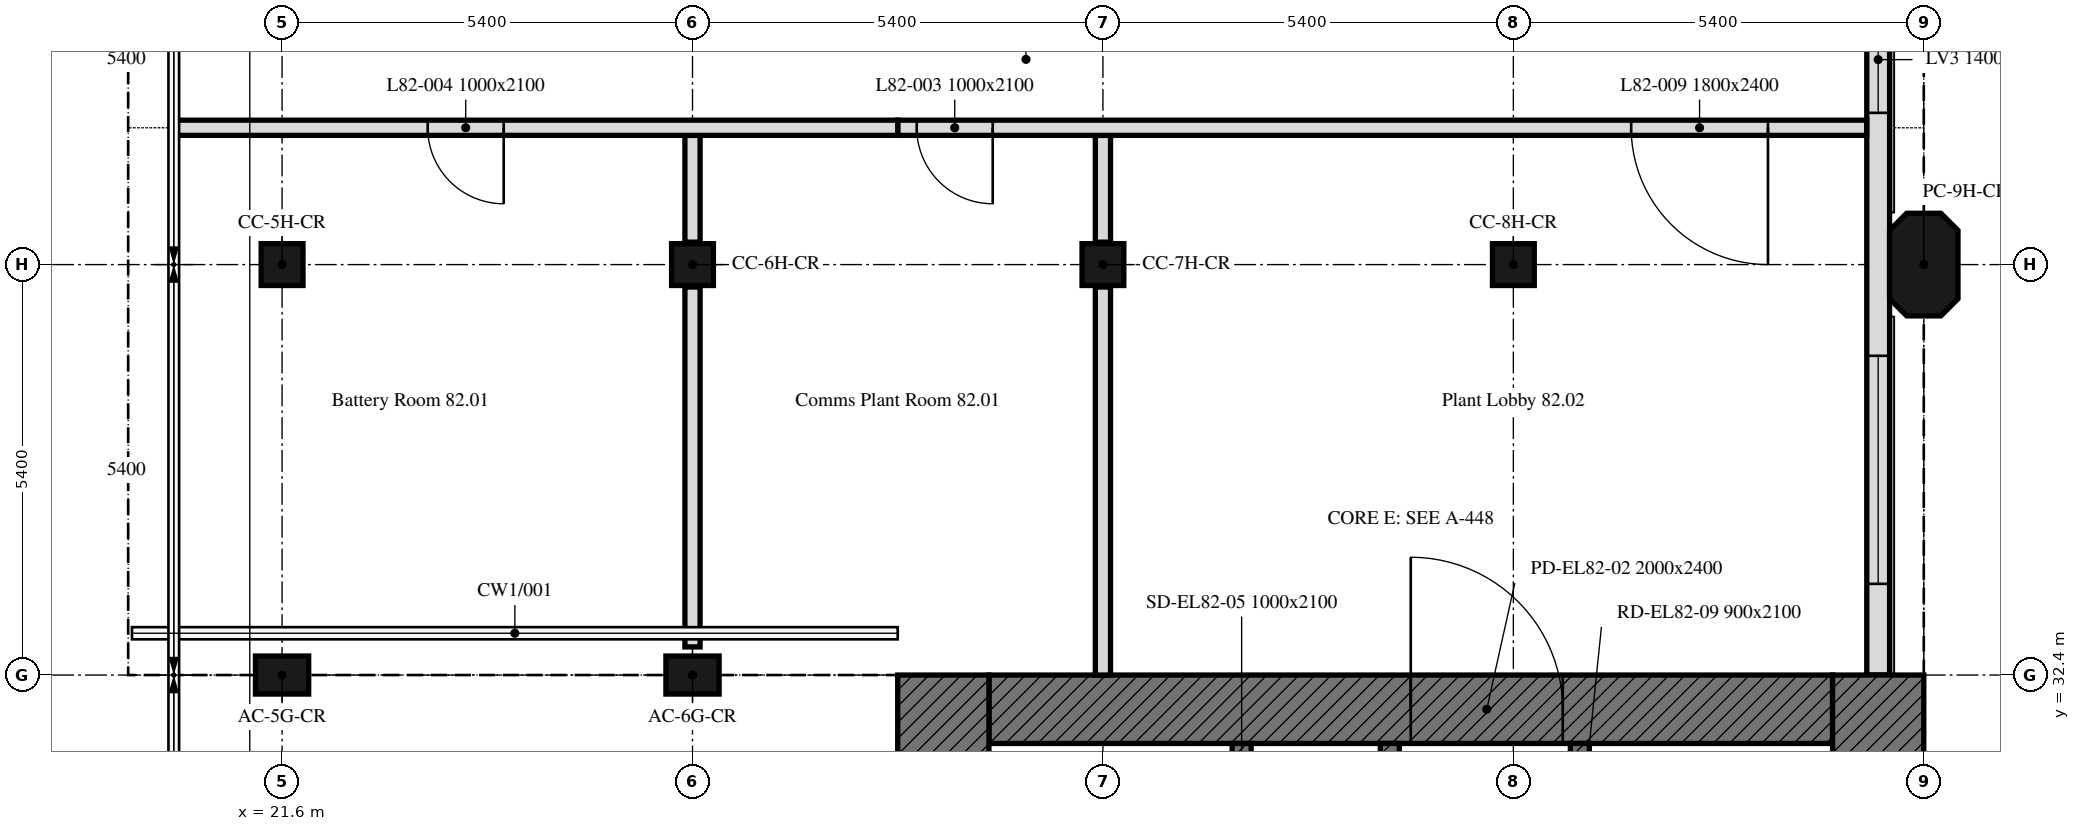
"""IFC4 building model, lengths in metres.
Left out: names, types, materials, properties, quantities, classifications, styles, units other than length and angle.
Written with IfcOpenShell. Run it as: python <this file> out.ifc"""

import sys

from ifc_helpers import new_model, si_unit, direction, frame, frame_2d, origin, origin_2d, place, context, subcontext, project, spatial, polyline, rectangle, outline, extrude, element, fill, save


model = new_model("IFC4")
c1 = context("Model", 3, precision=1e-05, world=origin(), true_north=direction((0.0, 1.0)))
c2 = subcontext(c1, "Body", "Model", "MODEL_VIEW")
j1 = project(units=[si_unit("LENGTHUNIT", "METRE"), si_unit("PLANEANGLEUNIT", "RADIAN")], contexts=[c1])
p1 = place(None, origin())
s1 = spatial("IfcSite", under=j1, at=p1, CompositionType="ELEMENT")
p2 = place(p1, origin())
s2 = spatial("IfcBuilding", under=s1, at=p2, CompositionType="ELEMENT")
p3 = place(p2, frame((0.0, 0.0, 330.7)))
s3 = spatial("IfcBuildingStorey", under=s2, at=p3, CompositionType="ELEMENT", Elevation=330.7)
p4 = place(p3, frame((21.6, 32.4, 0.0), z_axis=(0.0, 0.0, 1.0), x_axis=(1.0, 0.0, 0.0)))
e1 = element("IfcColumn", 1, at=p4, inside=s3, PredefinedType="COLUMN", context=c2, shape_type="SweptSolid", body=[
    extrude(rectangle(XDim=0.7, YDim=0.5, at=origin_2d()), origin(), (0.0, 0.0, 1.0), 3.6),
])
p5 = place(p3, frame((27.0, 32.4, 0.0), z_axis=(0.0, 0.0, 1.0), x_axis=(1.0, 0.0, 0.0)))
e2 = element("IfcColumn", 2, at=p5, inside=s3, PredefinedType="COLUMN", context=c2, shape_type="SweptSolid", body=[
    extrude(rectangle(XDim=0.7, YDim=0.5, at=origin_2d()), origin(), (0.0, 0.0, 1.0), 4.2),
])
p6 = place(p3, frame((21.6, 37.8, 0.0), z_axis=(0.0, 0.0, 1.0), x_axis=(1.0, 0.0, 0.0)))
e3 = element("IfcColumn", 3, at=p6, inside=s3, PredefinedType="COLUMN", context=c2, shape_type="SweptSolid", body=[
    extrude(rectangle(XDim=0.55, YDim=0.55, at=origin_2d()), origin(), (0.0, 0.0, 1.0), 3.6),
])
for number, where, z_axis, x_axis in (
    (4, (27.0, 37.8, 0.0), (0.0, 0.0, 1.0), (1.0, 0.0, 0.0)),
    (5, (32.4, 37.8, 0.0), (0.0, 0.0, 1.0), (1.0, 0.0, 0.0)),
    (6, (37.8, 37.8, 0.0), (0.0, 0.0, 1.0), (1.0, 0.0, 0.0)),
):
    element("IfcColumn", number, at=place(p3, frame(where, z_axis=z_axis, x_axis=x_axis)), inside=s3, PredefinedType="COLUMN", context=c2, shape_type="SweptSolid", body=[
        extrude(rectangle(XDim=0.55, YDim=0.55, at=origin_2d()), origin(), (0.0, 0.0, 1.0), 4.2),
    ])
p7 = place(p3, frame((43.2, 37.8, 0.0), z_axis=(0.0, 0.0, 1.0), x_axis=(0.0, 1.0, 0.0)))
e7 = element("IfcColumn", 7, at=p7, inside=s3, PredefinedType="COLUMN", context=c2, shape_type="SweptSolid", body=[
    extrude(outline(polyline([(-0.45, -0.45), (0.45, -0.45), (0.675, -0.225), (0.675, 0.225), (0.45, 0.45), (-0.45, 0.45), (-0.675, 0.225), (-0.675, -0.225), (-0.45, -0.45)])), origin(), (0.0, 0.0, 1.0), 4.2),
])
p8 = place(p3, frame((42.6, 32.4, 0.0), z_axis=(0.0, 0.0, 1.0), x_axis=(0.0, 1.0, 0.0)))
e8 = element("IfcWall", 8, at=p8, inside=s3, PredefinedType="SOLIDWALL", context=c2, shape_type="SweptSolid", body=[
    extrude(outline(polyline([(0.0, 0.0), (10.614, 0.0), (10.614, 4.2), (10.024, 4.2), (9.434, 4.2), (8.845, 4.2), (8.255, 4.2), (7.665, 4.2), (7.076, 4.2), (6.486, 4.2), (5.896, 4.2), (5.307, 4.2), (4.717, 4.2), (4.127, 4.2), (3.538, 4.2), (2.948, 4.2), (2.359, 4.2), (1.769, 4.2), (1.179, 4.2), (0.59, 4.2), (0.0, 4.2), (0.0, 0.0)])), frame((0.0, 0.15, 0.0), z_axis=(0.0, -1.0, 0.0), x_axis=(1.0, 0.0, 0.0)), (0.0, 0.0, 1.0), 0.3),
])
p9 = place(p8, frame((1.2, 0.0, 0.6)))
e9 = element("IfcOpeningElement", 9, at=p9, cuts=e8, PredefinedType="OPENING", context=c2, shape_type="SweptSolid", body=[
    extrude(rectangle(XDim=3.0, YDim=1.8, at=frame_2d((1.5, 0.9))), frame((0.0, 0.16, 0.0), z_axis=(0.0, -1.0, 0.0), x_axis=(1.0, 0.0, 0.0)), (0.0, 0.0, 1.0), 0.32),
])
p10 = place(p8, frame((7.396, 0.0, 0.6)))
e10 = element("IfcOpeningElement", 10, at=p10, cuts=e8, PredefinedType="OPENING", context=c2, shape_type="SweptSolid", body=[
    extrude(rectangle(XDim=1.4, YDim=1.8, at=frame_2d((0.7, 0.9))), frame((0.0, 0.16, 0.0), z_axis=(0.0, -1.0, 0.0), x_axis=(1.0, 0.0, 0.0)), (0.0, 0.0, 1.0), 0.32),
])
p11 = place(p3, frame((30.9, 31.95, 0.0), z_axis=(0.0, 0.0, 1.0), x_axis=(1.0, 0.0, 0.0)))
e11 = element("IfcWall", 11, at=p11, inside=s3, PredefinedType="SOLIDWALL", context=c2, shape_type="SweptSolid", body=[
    extrude(rectangle(XDim=11.1, YDim=0.9, at=frame_2d((5.55, 0.0))), origin(), (0.0, 0.0, 1.0), 4.2),
])
p12 = place(p11, frame((5.55, 0.0, 0.0)))
e12 = element("IfcOpeningElement", 12, at=p12, cuts=e11, PredefinedType="OPENING", context=c2, shape_type="SweptSolid", body=[
    extrude(rectangle(XDim=2.0, YDim=2.4, at=frame_2d((1.0, 1.2))), frame((0.0, 0.45, 0.0), z_axis=(0.0, -1.0, 0.0), x_axis=(1.0, 0.0, 0.0)), (0.0, 0.0, 1.0), 0.9),
])
for number, where, z_axis, x_axis in (
    (13, (42.6, 32.4, 0.0), (0.0, 0.0, 1.0), (0.0, -1.0, 0.0)),
    (14, (30.3, 16.2, 0.0), (0.0, 0.0, 1.0), (0.0, 1.0, 0.0)),
):
    element("IfcWall", number, at=place(p3, frame(where, z_axis=z_axis, x_axis=x_axis)), inside=s3, PredefinedType="SOLIDWALL", context=c2, shape_type="SweptSolid", body=[
        extrude(rectangle(XDim=16.2, YDim=1.2, at=frame_2d((8.1, 0.0))), origin(), (0.0, 0.0, 1.0), 4.2),
    ])
p13 = place(p3, frame((38.675, 17.1, 0.0), z_axis=(0.0, 0.0, 1.0), x_axis=(0.0, 1.0, 0.0)))
e15 = element("IfcWall", 15, at=p13, inside=s3, PredefinedType="SOLIDWALL", context=c2, shape_type="SweptSolid", body=[
    extrude(rectangle(XDim=14.4, YDim=0.25, at=frame_2d((7.2, 0.0))), origin(), (0.0, 0.0, 1.0), 4.2),
])
p14 = place(p13, frame((4.6, 0.0, 0.0)))
e16 = element("IfcOpeningElement", 16, at=p14, cuts=e15, PredefinedType="OPENING", context=c2, shape_type="SweptSolid", body=[
    extrude(rectangle(XDim=1.0, YDim=2.1, at=frame_2d((0.5, 1.05))), frame((0.0, 0.125, 0.0), z_axis=(0.0, -1.0, 0.0), x_axis=(1.0, 0.0, 0.0)), (0.0, 0.0, 1.0), 0.25),
])
p15 = place(p13, frame((7.062, 0.0, 0.0)))
e17 = element("IfcOpeningElement", 17, at=p15, cuts=e15, PredefinedType="OPENING", context=c2, shape_type="SweptSolid", body=[
    extrude(rectangle(XDim=1.2, YDim=2.1, at=frame_2d((0.6, 1.05))), frame((0.0, 0.125, 0.0), z_axis=(0.0, -1.0, 0.0), x_axis=(1.0, 0.0, 0.0)), (0.0, 0.0, 1.0), 0.25),
])
p16 = place(p13, frame((10.106, 0.0, 0.0)))
e18 = element("IfcOpeningElement", 18, at=p16, cuts=e15, PredefinedType="OPENING", context=c2, shape_type="SweptSolid", body=[
    extrude(rectangle(XDim=0.9, YDim=2.1, at=frame_2d((0.45, 1.05))), frame((0.0, 0.125, 0.0), z_axis=(0.0, -1.0, 0.0), x_axis=(1.0, 0.0, 0.0)), (0.0, 0.0, 1.0), 0.25),
])
p17 = place(p13, frame((12.719, 0.0, 0.0)))
e19 = element("IfcOpeningElement", 19, at=p17, cuts=e15, PredefinedType="OPENING", context=c2, shape_type="SweptSolid", body=[
    extrude(rectangle(XDim=0.9, YDim=2.1, at=frame_2d((0.45, 1.05))), frame((0.0, 0.125, 0.0), z_axis=(0.0, -1.0, 0.0), x_axis=(1.0, 0.0, 0.0)), (0.0, 0.0, 1.0), 0.25),
])
p18 = place(p3, frame((34.225, 17.1, 0.0), z_axis=(0.0, 0.0, 1.0), x_axis=(0.0, 1.0, 0.0)))
e20 = element("IfcWall", 20, at=p18, inside=s3, PredefinedType="SOLIDWALL", context=c2, shape_type="SweptSolid", body=[
    extrude(rectangle(XDim=14.4, YDim=0.25, at=frame_2d((7.2, 0.0))), origin(), (0.0, 0.0, 1.0), 4.2),
])
p19 = place(p18, frame((13.15, 0.0, 0.0)))
e21 = element("IfcOpeningElement", 21, at=p19, cuts=e20, PredefinedType="OPENING", context=c2, shape_type="SweptSolid", body=[
    extrude(rectangle(XDim=1.0, YDim=2.1, at=frame_2d((0.5, 1.05))), frame((0.0, 0.125, 0.0), z_axis=(0.0, -1.0, 0.0), x_axis=(1.0, 0.0, 0.0)), (0.0, 0.0, 1.0), 0.25),
])
p20 = place(p18, frame((0.968, 0.0, 0.0)))
e22 = element("IfcOpeningElement", 22, at=p20, cuts=e20, PredefinedType="OPENING", context=c2, shape_type="SweptSolid", body=[
    extrude(rectangle(XDim=0.9, YDim=2.1, at=frame_2d((0.45, 1.05))), frame((0.0, 0.125, 0.0), z_axis=(0.0, -1.0, 0.0), x_axis=(1.0, 0.0, 0.0)), (0.0, 0.0, 1.0), 0.25),
])
p21 = place(p18, frame((3.468, 0.0, 0.0)))
e23 = element("IfcOpeningElement", 23, at=p21, cuts=e20, PredefinedType="OPENING", context=c2, shape_type="SweptSolid", body=[
    extrude(rectangle(XDim=0.9, YDim=2.1, at=frame_2d((0.45, 1.05))), frame((0.0, 0.125, 0.0), z_axis=(0.0, -1.0, 0.0), x_axis=(1.0, 0.0, 0.0)), (0.0, 0.0, 1.0), 0.25),
])
p22 = place(p18, frame((6.175, 0.0, 0.0)))
e24 = element("IfcOpeningElement", 24, at=p22, cuts=e20, PredefinedType="OPENING", context=c2, shape_type="SweptSolid", body=[
    extrude(rectangle(XDim=0.9, YDim=2.1, at=frame_2d((0.45, 1.05))), frame((0.0, 0.125, 0.0), z_axis=(0.0, -1.0, 0.0), x_axis=(1.0, 0.0, 0.0)), (0.0, 0.0, 1.0), 0.25),
])
p23 = place(p3, frame((36.175, 29.4, 0.0), z_axis=(0.0, 0.0, 1.0), x_axis=(0.0, 1.0, 0.0)))
e25 = element("IfcWall", 25, at=p23, inside=s3, PredefinedType="SOLIDWALL", context=c2, shape_type="SweptSolid", body=[
    extrude(rectangle(XDim=2.1, YDim=0.25, at=frame_2d((1.05, 0.0))), origin(), (0.0, 0.0, 1.0), 4.2),
])
p24 = place(p23, frame((0.5, 0.0, 0.0)))
e26 = element("IfcOpeningElement", 26, at=p24, cuts=e25, PredefinedType="OPENING", context=c2, shape_type="SweptSolid", body=[
    extrude(rectangle(XDim=1.0, YDim=2.1, at=frame_2d((0.5, 1.05))), frame((0.0, 0.125, 0.0), z_axis=(0.0, -1.0, 0.0), x_axis=(1.0, 0.0, 0.0)), (0.0, 0.0, 1.0), 0.25),
])
p25 = place(p3, frame((32.4, 32.4, 0.0), z_axis=(0.0, 0.0, 1.0), x_axis=(0.0, 1.0, 0.0)))
e27 = element("IfcWall", 27, at=p25, inside=s3, PredefinedType="PARTITIONING", context=c2, shape_type="SweptSolid", body=[
    extrude(rectangle(XDim=5.105, YDim=0.2, at=frame_2d((2.552, 0.0))), origin(), (0.0, 0.0, 1.0), 3.45),
])
p26 = place(p3, frame((32.4, 38.095, 0.0), z_axis=(0.0, 0.0, 1.0), x_axis=(0.0, 1.0, 0.0)))
e28 = element("IfcWall", 28, at=p26, inside=s3, PredefinedType="PARTITIONING", context=c2, shape_type="SweptSolid", body=[
    extrude(rectangle(XDim=1.405, YDim=0.2, at=frame_2d((0.703, 0.0))), origin(), (0.0, 0.0, 1.0), 3.45),
])
p27 = place(p3, frame((27.0, 39.5, 0.0), z_axis=(0.0, 0.0, 1.0), x_axis=(0.0, -1.0, 0.0)))
e29 = element("IfcWall", 29, at=p27, inside=s3, PredefinedType="PARTITIONING", context=c2, shape_type="SweptSolid", body=[
    extrude(rectangle(XDim=1.405, YDim=0.2, at=frame_2d((0.703, 0.0))), origin(), (0.0, 0.0, 1.0), 6.0),
])
p28 = place(p3, frame((27.0, 37.505, 0.0), z_axis=(0.0, 0.0, 1.0), x_axis=(0.0, -1.0, 0.0)))
e30 = element("IfcWall", 30, at=p28, inside=s3, PredefinedType="PARTITIONING", context=c2, shape_type="SweptSolid", body=[
    extrude(rectangle(XDim=4.735, YDim=0.2, at=frame_2d((2.367, 0.0))), origin(), (0.0, 0.0, 1.0), 6.0),
])
p29 = place(p3, frame((42.449, 39.6, 0.0), z_axis=(0.0, 0.0, 1.0), x_axis=(-1.0, 0.0, 0.0)))
e31 = element("IfcWall", 31, at=p29, inside=s3, PredefinedType="PARTITIONING", context=c2, shape_type="SweptSolid", body=[
    extrude(rectangle(XDim=12.749, YDim=0.2, at=frame_2d((6.375, 0.0))), origin(), (0.0, 0.0, 1.0), 3.45),
])
p30 = place(p29, frame((11.499, 0.0, 0.0)))
e32 = element("IfcOpeningElement", 32, at=p30, cuts=e31, PredefinedType="OPENING", context=c2, shape_type="SweptSolid", body=[
    extrude(rectangle(XDim=1.0, YDim=2.1, at=frame_2d((0.5, 1.05))), frame((0.0, 0.1, 0.0), z_axis=(0.0, -1.0, 0.0), x_axis=(1.0, 0.0, 0.0)), (0.0, 0.0, 1.0), 0.2),
])
p31 = place(p29, frame((1.299, 0.0, 0.0)))
e33 = element("IfcOpeningElement", 33, at=p31, cuts=e31, PredefinedType="OPENING", context=c2, shape_type="SweptSolid", body=[
    extrude(rectangle(XDim=1.8, YDim=2.4, at=frame_2d((0.9, 1.2))), frame((0.0, 0.1, 0.0), z_axis=(0.0, -1.0, 0.0), x_axis=(1.0, 0.0, 0.0)), (0.0, 0.0, 1.0), 0.2),
])
p32 = place(p3, frame((29.7, 39.6, 0.0), z_axis=(0.0, 0.0, 1.0), x_axis=(-1.0, 0.0, 0.0)))
e34 = element("IfcWall", 34, at=p32, inside=s3, PredefinedType="PARTITIONING", context=c2, shape_type="SweptSolid", body=[
    extrude(outline(polyline([(0.0, 0.0), (9.525, 0.0), (9.525, 2.967), (0.0, 4.2), (0.0, 0.0)])), frame((0.0, 0.1, 0.0), z_axis=(0.0, -1.0, 0.0), x_axis=(1.0, 0.0, 0.0)), (0.0, 0.0, 1.0), 0.2),
])
p33 = place(p32, frame((5.184, 0.0, 0.0)))
e35 = element("IfcOpeningElement", 35, at=p33, cuts=e34, PredefinedType="OPENING", context=c2, shape_type="SweptSolid", body=[
    extrude(rectangle(XDim=1.0, YDim=2.1, at=frame_2d((0.5, 1.05))), frame((0.0, 0.1, 0.0), z_axis=(0.0, -1.0, 0.0), x_axis=(1.0, 0.0, 0.0)), (0.0, 0.0, 1.0), 0.2),
])
p34 = place(p9, origin())
e36 = element("IfcWindow", 36, at=p34, inside=s3, PartitioningType="SINGLE_PANEL", PredefinedType="WINDOW", context=c2, shape_type="SweptSolid", body=[
    extrude(rectangle(XDim=3.0, YDim=1.8, at=frame_2d((1.5, 0.9))), frame((0.0, 0.03, 0.0), z_axis=(0.0, -1.0, 0.0), x_axis=(1.0, 0.0, 0.0)), (0.0, 0.0, 1.0), 0.06),
])
fill(e9, e36)
p35 = place(p10, origin())
e37 = element("IfcWindow", 37, at=p35, inside=s3, PartitioningType="SINGLE_PANEL", PredefinedType="WINDOW", context=c2, shape_type="SweptSolid", body=[
    extrude(rectangle(XDim=1.4, YDim=1.8, at=frame_2d((0.7, 0.9))), frame((0.0, 0.03, 0.0), z_axis=(0.0, -1.0, 0.0), x_axis=(1.0, 0.0, 0.0)), (0.0, 0.0, 1.0), 0.06),
])
fill(e10, e37)
p36 = place(p12, origin())
e38 = element("IfcDoor", 38, at=p36, inside=s3, OperationType="DOUBLE_DOOR_SINGLE_SWING", PredefinedType="DOOR", context=c2, shape_type="SweptSolid", body=[
    extrude(rectangle(XDim=2.0, YDim=2.4, at=frame_2d((1.0, 1.2))), frame((0.0, 0.025, 0.0), z_axis=(0.0, -1.0, 0.0), x_axis=(1.0, 0.0, 0.0)), (0.0, 0.0, 1.0), 0.05),
])
fill(e12, e38)
p37 = place(p30, origin())
e39 = element("IfcDoor", 39, at=p37, inside=s3, OperationType="SINGLE_SWING_RIGHT", PredefinedType="DOOR", context=c2, shape_type="SweptSolid", body=[
    extrude(rectangle(XDim=1.0, YDim=2.1, at=frame_2d((0.5, 1.05))), frame((0.0, 0.025, 0.0), z_axis=(0.0, -1.0, 0.0), x_axis=(1.0, 0.0, 0.0)), (0.0, 0.0, 1.0), 0.05),
])
fill(e32, e39)
p38 = place(p33, origin())
e40 = element("IfcDoor", 40, at=p38, inside=s3, OperationType="SINGLE_SWING_LEFT", PredefinedType="DOOR", context=c2, shape_type="SweptSolid", body=[
    extrude(rectangle(XDim=1.0, YDim=2.1, at=frame_2d((0.5, 1.05))), frame((0.0, 0.025, 0.0), z_axis=(0.0, -1.0, 0.0), x_axis=(1.0, 0.0, 0.0)), (0.0, 0.0, 1.0), 0.05),
])
fill(e35, e40)
p39 = place(p31, origin())
e41 = element("IfcDoor", 41, at=p39, inside=s3, OperationType="DOUBLE_DOOR_SINGLE_SWING", PredefinedType="DOOR", context=c2, shape_type="SweptSolid", body=[
    extrude(rectangle(XDim=1.8, YDim=2.4, at=frame_2d((0.9, 1.2))), frame((0.0, 0.025, 0.0), z_axis=(0.0, -1.0, 0.0), x_axis=(1.0, 0.0, 0.0)), (0.0, 0.0, 1.0), 0.05),
])
fill(e33, e41)
save(model, sys.argv[1])
